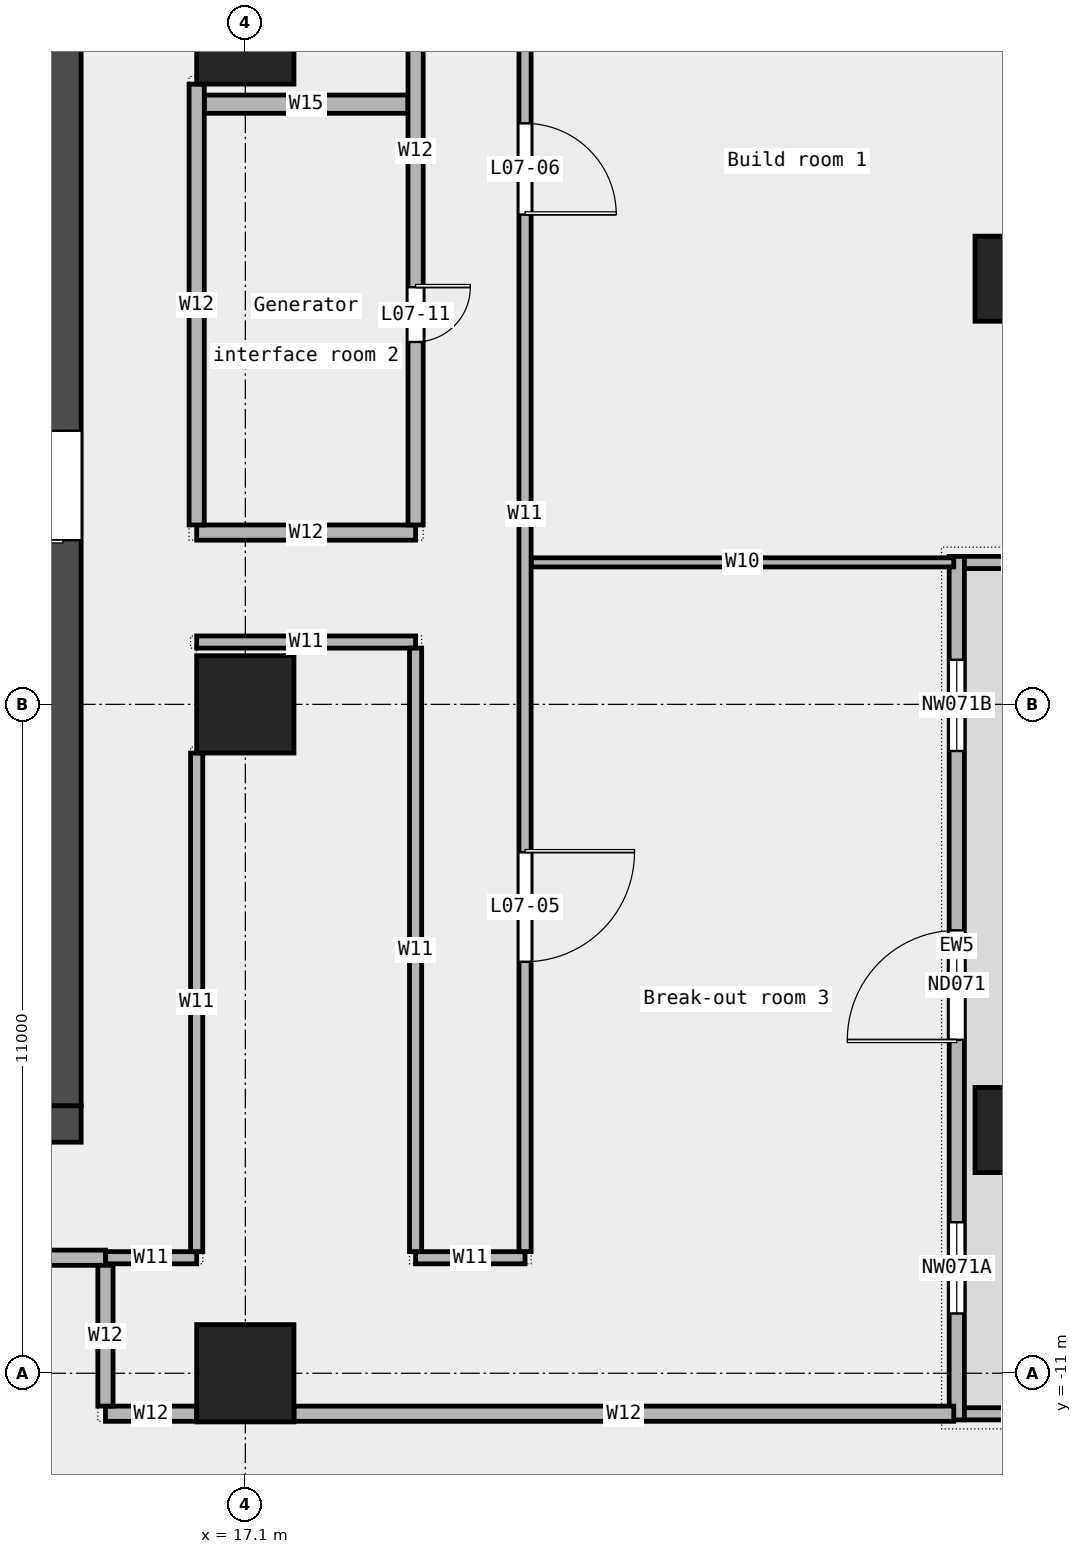
"""IFC4 building model, lengths in metres.
Left out: names, types, materials, properties, quantities, classifications, styles, units other than length and angle.
Written with IfcOpenShell. Run it as: python <this file> out.ifc"""

import sys

from ifc_helpers import new_model, si_unit, direction, frame, frame_2d, origin, origin_2d, place, context, subcontext, project, spatial, rectangle, extrude, element, fill, save


model = new_model("IFC4")
c1 = context("Model", 3, precision=1e-05, world=origin(), true_north=direction((0.0, 1.0)))
c2 = subcontext(c1, "Body", "Model", "MODEL_VIEW")
j1 = project(units=[si_unit("LENGTHUNIT", "METRE"), si_unit("PLANEANGLEUNIT", "RADIAN")], contexts=[c1])
p1 = place(None, origin())
s1 = spatial("IfcSite", under=j1, at=p1, CompositionType="ELEMENT")
p2 = place(p1, origin())
s2 = spatial("IfcBuilding", under=s1, at=p2, CompositionType="ELEMENT")
p3 = place(p2, frame((0.0, 0.0, 40.6)))
s3 = spatial("IfcBuildingStorey", under=s2, at=p3, CompositionType="ELEMENT", Elevation=40.6)
for number, where, z_axis, x_axis in (
    (1, (29.8, -7.0, 0.0), (0.0, 0.0, 1.0), (1.0, 0.0, 0.0)),
    (2, (29.8, 7.0, 0.0), (0.0, 0.0, 1.0), (1.0, 0.0, 0.0)),
):
    element("IfcColumn", number, at=place(p3, frame(where, z_axis=z_axis, x_axis=x_axis)), inside=s3, PredefinedType="COLUMN", context=c2, shape_type="SweptSolid", body=[
        extrude(rectangle(XDim=1.4, YDim=1.4, at=origin_2d()), origin(), (0.0, 0.0, 1.0), 4.35),
    ])
for number, where, z_axis, x_axis in (
    (3, (17.1, -11.0, 0.0), (0.0, 0.0, 1.0), (1.0, 0.0, 0.0)),
    (4, (17.1, 0.0, 0.0), (0.0, 0.0, 1.0), (1.0, 0.0, 0.0)),
    (5, (17.1, 11.0, 0.0), (0.0, 0.0, 1.0), (1.0, 0.0, 0.0)),
):
    element("IfcColumn", number, at=place(p3, frame(where, z_axis=z_axis, x_axis=x_axis)), inside=s3, PredefinedType="COLUMN", context=c2, shape_type="SweptSolid", body=[
        extrude(rectangle(XDim=1.6, YDim=1.6, at=origin_2d()), origin(), (0.0, 0.0, 1.0), 4.35),
    ])
p4 = place(p3, frame((28.8, -11.767, 0.0), z_axis=(0.0, 0.0, 1.0), x_axis=(0.0, 1.0, 0.0)))
e6 = element("IfcWall", 6, at=p4, inside=s3, PredefinedType="STANDARD", context=c2, shape_type="SweptSolid", body=[
    extrude(rectangle(XDim=14.2, YDim=0.25, at=frame_2d((7.1, 0.0))), origin(), (0.0, 0.0, 1.0), 4.35),
])
p5 = place(p4, frame((1.75, 0.0, 0.45)))
e7 = element("IfcOpeningElement", 7, at=p5, cuts=e6, PredefinedType="OPENING", context=c2, shape_type="SweptSolid", body=[
    extrude(rectangle(XDim=1.5, YDim=3.0, at=frame_2d((0.75, 1.5))), frame((0.0, 0.137, 0.0), z_axis=(0.0, -1.0, 0.0), x_axis=(1.0, 0.0, 0.0)), (0.0, 0.0, 1.0), 0.274),
])
p6 = place(p4, frame((6.25, 0.0, 0.0)))
e8 = element("IfcOpeningElement", 8, at=p6, cuts=e6, PredefinedType="OPENING", context=c2, shape_type="SweptSolid", body=[
    extrude(rectangle(XDim=1.8, YDim=2.4, at=frame_2d((0.9, 1.2))), frame((0.0, 0.137, 0.0), z_axis=(0.0, -1.0, 0.0), x_axis=(1.0, 0.0, 0.0)), (0.0, 0.0, 1.0), 0.274),
])
p7 = place(p4, frame((11.0, 0.0, 0.45)))
e9 = element("IfcOpeningElement", 9, at=p7, cuts=e6, PredefinedType="OPENING", context=c2, shape_type="SweptSolid", body=[
    extrude(rectangle(XDim=1.5, YDim=3.0, at=frame_2d((0.75, 1.5))), frame((0.0, 0.137, 0.0), z_axis=(0.0, -1.0, 0.0), x_axis=(1.0, 0.0, 0.0)), (0.0, 0.0, 1.0), 0.274),
])
for number, where, z_axis, x_axis in (
    (10, (30.8, -11.667, 0.0), (0.0, 0.0, 1.0), (-1.0, 0.0, 0.0)),
    (11, (30.8, 2.333, 0.0), (0.0, 0.0, 1.0), (-1.0, 0.0, 0.0)),
):
    element("IfcWall", number, at=place(p3, frame(where, z_axis=z_axis, x_axis=x_axis)), inside=s3, PredefinedType="STANDARD", context=c2, shape_type="SweptSolid", body=[
        extrude(rectangle(XDim=1.875, YDim=0.2, at=frame_2d((0.938, 0.0))), origin(), (0.0, 0.0, 1.0), 4.35),
    ])
p8 = place(p3, frame((14.8, -11.665, 0.0), z_axis=(0.0, 0.0, 1.0), x_axis=(1.0, 0.0, 0.0)))
e12 = element("IfcWall", 12, at=p8, inside=s3, PredefinedType="PARTITIONING", context=c2, shape_type="SweptSolid", body=[
    extrude(rectangle(XDim=1.5, YDim=0.25, at=frame_2d((0.75, 0.0))), origin(), (0.0, 0.0, 1.0), 4.35),
])
p9 = place(p3, frame((17.9, -11.665, 0.0), z_axis=(0.0, 0.0, 1.0), x_axis=(1.0, 0.0, 0.0)))
e13 = element("IfcWall", 13, at=p9, inside=s3, PredefinedType="PARTITIONING", context=c2, shape_type="SweptSolid", body=[
    extrude(rectangle(XDim=10.85, YDim=0.25, at=frame_2d((5.425, 0.0))), origin(), (0.0, 0.0, 1.0), 4.35),
])
p10 = place(p3, frame((14.8, -9.1, 0.0), z_axis=(0.0, 0.0, 1.0), x_axis=(1.0, 0.0, 0.0)))
e14 = element("IfcWall", 14, at=p10, inside=s3, PredefinedType="PARTITIONING", context=c2, shape_type="SweptSolid", body=[
    extrude(rectangle(XDim=1.5, YDim=0.2, at=frame_2d((0.75, 0.0))), origin(), (0.0, 0.0, 1.0), 4.35),
])
p11 = place(p3, frame((19.9, -9.1, 0.0), z_axis=(0.0, 0.0, 1.0), x_axis=(1.0, 0.0, 0.0)))
e15 = element("IfcWall", 15, at=p11, inside=s3, PredefinedType="PARTITIONING", context=c2, shape_type="SweptSolid", body=[
    extrude(rectangle(XDim=1.8, YDim=0.2, at=frame_2d((0.9, 0.0))), origin(), (0.0, 0.0, 1.0), 4.35),
])
p12 = place(p3, frame((-14.8, -9.1, 0.0), z_axis=(0.0, 0.0, 1.0), x_axis=(1.0, 0.0, 0.0)))
e16 = element("IfcWall", 16, at=p12, inside=s3, PredefinedType="PARTITIONING", context=c2, shape_type="SweptSolid", body=[
    extrude(rectangle(XDim=29.6, YDim=0.25, at=frame_2d((14.8, 0.0))), origin(), (0.0, 0.0, 1.0), 4.35),
])
p13 = place(p12, frame((22.998, 0.0, 0.0)))
e17 = element("IfcOpeningElement", 17, at=p13, cuts=e16, PredefinedType="OPENING", context=c2, shape_type="SweptSolid", body=[
    extrude(rectangle(XDim=1.8, YDim=2.1, at=frame_2d((0.9, 1.05))), frame((0.0, 0.137, 0.0), z_axis=(0.0, -1.0, 0.0), x_axis=(1.0, 0.0, 0.0)), (0.0, 0.0, 1.0), 0.274),
])
p14 = place(p12, frame((9.998, 0.0, 0.0)))
e18 = element("IfcOpeningElement", 18, at=p14, cuts=e16, PredefinedType="OPENING", context=c2, shape_type="SweptSolid", body=[
    extrude(rectangle(XDim=1.8, YDim=2.1, at=frame_2d((0.9, 1.05))), frame((0.0, 0.137, 0.0), z_axis=(0.0, -1.0, 0.0), x_axis=(1.0, 0.0, 0.0)), (0.0, 0.0, 1.0), 0.274),
])
p15 = place(p3, frame((16.3, 1.025, 0.0), z_axis=(0.0, 0.0, 1.0), x_axis=(1.0, 0.0, 0.0)))
e19 = element("IfcWall", 19, at=p15, inside=s3, PredefinedType="PARTITIONING", context=c2, shape_type="SweptSolid", body=[
    extrude(rectangle(XDim=3.6, YDim=0.2, at=frame_2d((1.8, 0.0))), origin(), (0.0, 0.0, 1.0), 4.35),
])
p16 = place(p3, frame((21.8, 2.335, 0.0), z_axis=(0.0, 0.0, 1.0), x_axis=(1.0, 0.0, 0.0)))
e20 = element("IfcWall", 20, at=p16, inside=s3, PredefinedType="PARTITIONING", context=c2, shape_type="SweptSolid", body=[
    extrude(rectangle(XDim=6.95, YDim=0.15, at=frame_2d((3.475, 0.0))), origin(), (0.0, 0.0, 1.0), 4.35),
])
p17 = place(p3, frame((16.3, 2.825, 0.0), z_axis=(0.0, 0.0, 1.0), x_axis=(1.0, 0.0, 0.0)))
e21 = element("IfcWall", 21, at=p17, inside=s3, PredefinedType="PARTITIONING", context=c2, shape_type="SweptSolid", body=[
    extrude(rectangle(XDim=3.6, YDim=0.25, at=frame_2d((1.8, 0.0))), origin(), (0.0, 0.0, 1.0), 4.35),
])
p18 = place(p3, frame((16.425, 9.87, 0.0), z_axis=(0.0, 0.0, 1.0), x_axis=(1.0, 0.0, 0.0)))
e22 = element("IfcWall", 22, at=p18, inside=s3, PredefinedType="PARTITIONING", context=c2, shape_type="SweptSolid", body=[
    extrude(rectangle(XDim=3.35, YDim=0.3, at=frame_2d((1.675, 0.0))), origin(), (0.0, 0.0, 1.0), 4.35),
])
p19 = place(p3, frame((14.8, -11.54, 0.0), z_axis=(0.0, 0.0, 1.0), x_axis=(0.0, 1.0, 0.0)))
e23 = element("IfcWall", 23, at=p19, inside=s3, PredefinedType="PARTITIONING", context=c2, shape_type="SweptSolid", body=[
    extrude(rectangle(XDim=2.315, YDim=0.25, at=frame_2d((1.157, 0.0))), origin(), (0.0, 0.0, 1.0), 4.35),
])
p20 = place(p3, frame((16.3, -9.0, 0.0), z_axis=(0.0, 0.0, 1.0), x_axis=(0.0, 1.0, 0.0)))
e24 = element("IfcWall", 24, at=p20, inside=s3, PredefinedType="PARTITIONING", context=c2, shape_type="SweptSolid", body=[
    extrude(rectangle(XDim=8.2, YDim=0.2, at=frame_2d((4.1, 0.0))), origin(), (0.0, 0.0, 1.0), 4.35),
])
p21 = place(p3, frame((16.3, 2.95, 0.0), z_axis=(0.0, 0.0, 1.0), x_axis=(0.0, 1.0, 0.0)))
e25 = element("IfcWall", 25, at=p21, inside=s3, PredefinedType="PARTITIONING", context=c2, shape_type="SweptSolid", body=[
    extrude(rectangle(XDim=7.25, YDim=0.25, at=frame_2d((3.625, 0.0))), origin(), (0.0, 0.0, 1.0), 4.35),
])
p22 = place(p3, frame((19.9, -9.0, 0.0), z_axis=(0.0, 0.0, 1.0), x_axis=(0.0, 1.0, 0.0)))
e26 = element("IfcWall", 26, at=p22, inside=s3, PredefinedType="PARTITIONING", context=c2, shape_type="SweptSolid", body=[
    extrude(rectangle(XDim=9.925, YDim=0.2, at=frame_2d((4.962, 0.0))), origin(), (0.0, 0.0, 1.0), 4.35),
])
p23 = place(p3, frame((19.9, 2.95, 0.0), z_axis=(0.0, 0.0, 1.0), x_axis=(0.0, 1.0, 0.0)))
e27 = element("IfcWall", 27, at=p23, inside=s3, PredefinedType="PARTITIONING", context=c2, shape_type="SweptSolid", body=[
    extrude(rectangle(XDim=12.3, YDim=0.25, at=frame_2d((6.15, 0.0))), origin(), (0.0, 0.0, 1.0), 4.35),
])
p24 = place(p23, frame((9.16, 0.0, 0.0)))
e28 = element("IfcOpeningElement", 28, at=p24, cuts=e27, PredefinedType="OPENING", context=c2, shape_type="SweptSolid", body=[
    extrude(rectangle(XDim=0.9, YDim=2.1, at=frame_2d((0.45, 1.05))), frame((0.0, 0.137, 0.0), z_axis=(0.0, -1.0, 0.0), x_axis=(1.0, 0.0, 0.0)), (0.0, 0.0, 1.0), 0.274),
])
p25 = place(p23, frame((3.01, 0.0, 0.0)))
e29 = element("IfcOpeningElement", 29, at=p25, cuts=e27, PredefinedType="OPENING", context=c2, shape_type="SweptSolid", body=[
    extrude(rectangle(XDim=0.9, YDim=2.1, at=frame_2d((0.45, 1.05))), frame((0.0, 0.137, 0.0), z_axis=(0.0, -1.0, 0.0), x_axis=(1.0, 0.0, 0.0)), (0.0, 0.0, 1.0), 0.274),
])
p26 = place(p3, frame((21.7, -9.0, 0.0), z_axis=(0.0, 0.0, 1.0), x_axis=(0.0, 1.0, 0.0)))
e30 = element("IfcWall", 30, at=p26, inside=s3, PredefinedType="PARTITIONING", context=c2, shape_type="SweptSolid", body=[
    extrude(rectangle(XDim=24.275, YDim=0.2, at=frame_2d((12.137, 0.0))), origin(), (0.0, 0.0, 1.0), 4.35),
])
p27 = place(p26, frame((4.768, 0.0, 0.0)))
e31 = element("IfcOpeningElement", 31, at=p27, cuts=e30, PredefinedType="OPENING", context=c2, shape_type="SweptSolid", body=[
    extrude(rectangle(XDim=1.8, YDim=2.1, at=frame_2d((0.9, 1.05))), frame((0.0, 0.112, 0.0), z_axis=(0.0, -1.0, 0.0), x_axis=(1.0, 0.0, 0.0)), (0.0, 0.0, 1.0), 0.224),
])
p28 = place(p26, frame((17.055, 0.0, 0.0)))
e32 = element("IfcOpeningElement", 32, at=p28, cuts=e30, PredefinedType="OPENING", context=c2, shape_type="SweptSolid", body=[
    extrude(rectangle(XDim=1.5, YDim=2.1, at=frame_2d((0.75, 1.05))), frame((0.0, 0.112, 0.0), z_axis=(0.0, -1.0, 0.0), x_axis=(1.0, 0.0, 0.0)), (0.0, 0.0, 1.0), 0.224),
])
p29 = place(p3, frame((-14.4, -6.9, 0.0), z_axis=(0.0, 0.0, 1.0), x_axis=(1.0, 0.0, 0.0)))
e33 = element("IfcWall", 33, at=p29, inside=s3, PredefinedType="SHEAR", context=c2, shape_type="SweptSolid", body=[
    extrude(rectangle(XDim=28.8, YDim=0.6, at=frame_2d((14.4, 0.0))), origin(), (0.0, 0.0, 1.0), 4.5),
])
p30 = place(p29, frame((4.337, 0.0, 0.0)))
e34 = element("IfcOpeningElement", 34, at=p30, cuts=e33, PredefinedType="OPENING", context=c2, shape_type="SweptSolid", body=[
    extrude(rectangle(XDim=1.0, YDim=2.1, at=frame_2d((0.5, 1.05))), frame((0.0, 0.312, 0.0), z_axis=(0.0, -1.0, 0.0), x_axis=(1.0, 0.0, 0.0)), (0.0, 0.0, 1.0), 0.624),
])
p31 = place(p29, frame((6.212, 0.0, 0.0)))
e35 = element("IfcOpeningElement", 35, at=p31, cuts=e33, PredefinedType="OPENING", context=c2, shape_type="SweptSolid", body=[
    extrude(rectangle(XDim=1.0, YDim=2.1, at=frame_2d((0.5, 1.05))), frame((0.0, 0.312, 0.0), z_axis=(0.0, -1.0, 0.0), x_axis=(1.0, 0.0, 0.0)), (0.0, 0.0, 1.0), 0.624),
])
p32 = place(p29, frame((10.8, 0.0, 0.0)))
e36 = element("IfcOpeningElement", 36, at=p32, cuts=e33, PredefinedType="OPENING", context=c2, shape_type="SweptSolid", body=[
    extrude(rectangle(XDim=1.2, YDim=2.1, at=frame_2d((0.6, 1.05))), frame((0.0, 0.312, 0.0), z_axis=(0.0, -1.0, 0.0), x_axis=(1.0, 0.0, 0.0)), (0.0, 0.0, 1.0), 0.624),
])
p33 = place(p29, frame((15.587, 0.0, 0.0)))
e37 = element("IfcOpeningElement", 37, at=p33, cuts=e33, PredefinedType="OPENING", context=c2, shape_type="SweptSolid", body=[
    extrude(rectangle(XDim=1.0, YDim=2.1, at=frame_2d((0.5, 1.05))), frame((0.0, 0.312, 0.0), z_axis=(0.0, -1.0, 0.0), x_axis=(1.0, 0.0, 0.0)), (0.0, 0.0, 1.0), 0.624),
])
p34 = place(p29, frame((18.75, 0.0, 0.0)))
e38 = element("IfcOpeningElement", 38, at=p34, cuts=e33, PredefinedType="OPENING", context=c2, shape_type="SweptSolid", body=[
    extrude(rectangle(XDim=1.8, YDim=2.1, at=frame_2d((0.9, 1.05))), frame((0.0, 0.312, 0.0), z_axis=(0.0, -1.0, 0.0), x_axis=(1.0, 0.0, 0.0)), (0.0, 0.0, 1.0), 0.624),
])
p35 = place(p29, frame((23.087, 0.0, 0.0)))
e39 = element("IfcOpeningElement", 39, at=p35, cuts=e33, PredefinedType="OPENING", context=c2, shape_type="SweptSolid", body=[
    extrude(rectangle(XDim=1.0, YDim=2.1, at=frame_2d((0.5, 1.05))), frame((0.0, 0.312, 0.0), z_axis=(0.0, -1.0, 0.0), x_axis=(1.0, 0.0, 0.0)), (0.0, 0.0, 1.0), 0.624),
])
p36 = place(p3, frame((14.1, -6.6, 0.0), z_axis=(0.0, 0.0, 1.0), x_axis=(0.0, 1.0, 0.0)))
e40 = element("IfcWall", 40, at=p36, inside=s3, PredefinedType="SHEAR", context=c2, shape_type="SweptSolid", body=[
    extrude(rectangle(XDim=19.5, YDim=0.6, at=frame_2d((9.75, 0.0))), origin(), (0.0, 0.0, 1.0), 4.5),
])
p37 = place(p36, frame((9.3, 0.0, 0.0)))
e41 = element("IfcOpeningElement", 41, at=p37, cuts=e40, PredefinedType="OPENING", context=c2, shape_type="SweptSolid", body=[
    extrude(rectangle(XDim=1.8, YDim=2.1, at=frame_2d((0.9, 1.05))), frame((0.0, 0.312, 0.0), z_axis=(0.0, -1.0, 0.0), x_axis=(1.0, 0.0, 0.0)), (0.0, 0.0, 1.0), 0.624),
])
p38 = place(p5, origin())
e42 = element("IfcWindow", 42, at=p38, inside=s3, PartitioningType="SINGLE_PANEL", PredefinedType="WINDOW", context=c2, shape_type="SweptSolid", body=[
    extrude(rectangle(XDim=1.5, YDim=3.0, at=frame_2d((0.75, 1.5))), frame((0.0, 0.03, 0.0), z_axis=(0.0, -1.0, 0.0), x_axis=(1.0, 0.0, 0.0)), (0.0, 0.0, 1.0), 0.06),
])
fill(e7, e42)
p39 = place(p6, origin())
e43 = element("IfcDoor", 43, at=p39, inside=s3, OperationType="DOUBLE_DOOR_SINGLE_SWING", PredefinedType="DOOR", context=c2, shape_type="SweptSolid", body=[
    extrude(rectangle(XDim=1.8, YDim=2.4, at=frame_2d((0.9, 1.2))), frame((0.0, 0.025, 0.0), z_axis=(0.0, -1.0, 0.0), x_axis=(1.0, 0.0, 0.0)), (0.0, 0.0, 1.0), 0.05),
])
fill(e8, e43)
p40 = place(p7, origin())
e44 = element("IfcWindow", 44, at=p40, inside=s3, PartitioningType="SINGLE_PANEL", PredefinedType="WINDOW", context=c2, shape_type="SweptSolid", body=[
    extrude(rectangle(XDim=1.5, YDim=3.0, at=frame_2d((0.75, 1.5))), frame((0.0, 0.03, 0.0), z_axis=(0.0, -1.0, 0.0), x_axis=(1.0, 0.0, 0.0)), (0.0, 0.0, 1.0), 0.06),
])
fill(e9, e44)
p41 = place(p27, origin())
e45 = element("IfcDoor", 45, at=p41, inside=s3, OperationType="DOUBLE_DOOR_SINGLE_SWING", PredefinedType="DOOR", context=c2, shape_type="SweptSolid", body=[
    extrude(rectangle(XDim=1.8, YDim=2.1, at=frame_2d((0.9, 1.05))), frame((0.0, 0.025, 0.0), z_axis=(0.0, -1.0, 0.0), x_axis=(1.0, 0.0, 0.0)), (0.0, 0.0, 1.0), 0.05),
])
fill(e31, e45)
p42 = place(p28, origin())
e46 = element("IfcDoor", 46, at=p42, inside=s3, OperationType="DOUBLE_DOOR_SINGLE_SWING", PredefinedType="DOOR", context=c2, shape_type="SweptSolid", body=[
    extrude(rectangle(XDim=1.5, YDim=2.1, at=frame_2d((0.75, 1.05))), frame((0.0, 0.025, 0.0), z_axis=(0.0, -1.0, 0.0), x_axis=(1.0, 0.0, 0.0)), (0.0, 0.0, 1.0), 0.05),
])
fill(e32, e46)
p43 = place(p25, origin())
e47 = element("IfcDoor", 47, at=p43, inside=s3, OperationType="SINGLE_SWING_LEFT", PredefinedType="DOOR", context=c2, shape_type="SweptSolid", body=[
    extrude(rectangle(XDim=0.9, YDim=2.1, at=frame_2d((0.45, 1.05))), frame((0.0, 0.025, 0.0), z_axis=(0.0, -1.0, 0.0), x_axis=(1.0, 0.0, 0.0)), (0.0, 0.0, 1.0), 0.05),
])
fill(e29, e47)
p44 = place(p37, origin())
e48 = element("IfcDoor", 48, at=p44, inside=s3, OperationType="DOUBLE_DOOR_SINGLE_SWING", PredefinedType="DOOR", context=c2, shape_type="SweptSolid", body=[
    extrude(rectangle(XDim=1.8, YDim=2.1, at=frame_2d((0.9, 1.05))), frame((0.0, 0.025, 0.0), z_axis=(0.0, -1.0, 0.0), x_axis=(1.0, 0.0, 0.0)), (0.0, 0.0, 1.0), 0.05),
])
fill(e41, e48)
save(model, sys.argv[1])
